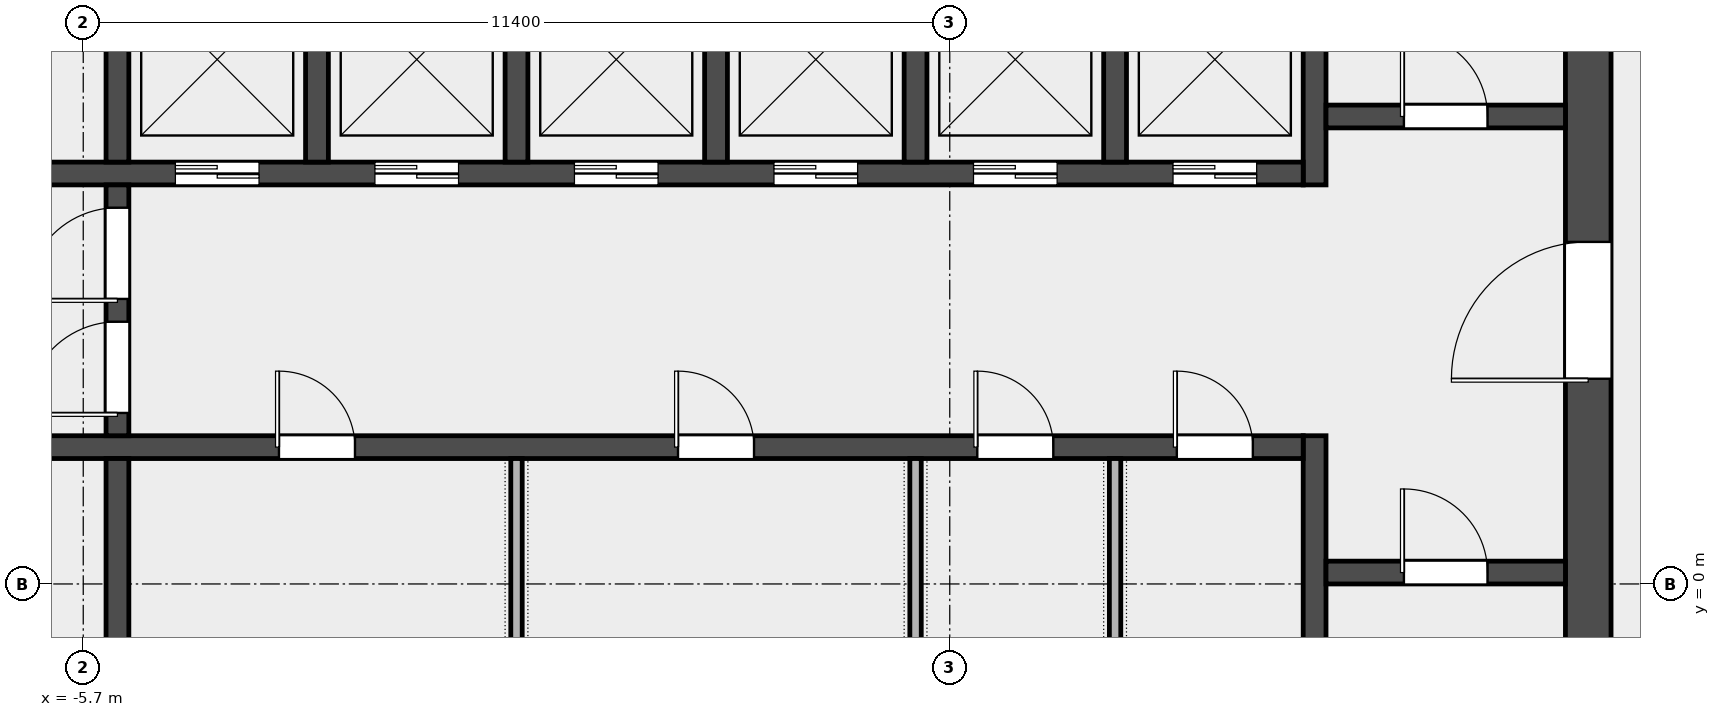
"""IFC4 building model, lengths in metres.
Left out: names, types, materials, properties, quantities, classifications, styles, units other than length and angle.
Written with IfcOpenShell. Run it as: python <this file> out.ifc"""

import sys

from ifc_helpers import new_model, si_unit, direction, frame, frame_2d, origin, place, context, subcontext, project, spatial, rectangle, extrude, element, fill, save


model = new_model("IFC4")
c1 = context("Model", 3, precision=1e-05, world=origin(), true_north=direction((0.0, 1.0)))
c2 = subcontext(c1, "Body", "Model", "MODEL_VIEW")
j1 = project(units=[si_unit("LENGTHUNIT", "METRE"), si_unit("PLANEANGLEUNIT", "RADIAN")], contexts=[c1])
p1 = place(None, origin())
s1 = spatial("IfcSite", under=j1, at=p1, CompositionType="ELEMENT")
p2 = place(p1, origin())
s2 = spatial("IfcBuilding", under=s1, at=p2, CompositionType="ELEMENT")
p3 = place(p2, frame((0.0, 0.0, 219.0)))
s3 = spatial("IfcBuildingStorey", under=s2, at=p3, CompositionType="ELEMENT", Elevation=219.0)
p4 = place(p3, frame((14.1, -6.6, 0.0), z_axis=(0.0, 0.0, 1.0), x_axis=(0.0, 1.0, 0.0)))
e1 = element("IfcWall", 1, at=p4, inside=s3, PredefinedType="SHEAR", context=c2, shape_type="SweptSolid", body=[
    extrude(rectangle(XDim=19.5, YDim=0.6, at=frame_2d((9.75, 0.0))), origin(), (0.0, 0.0, 1.0), 3.7),
])
p5 = place(p4, frame((9.3, 0.0, 0.0)))
e2 = element("IfcOpeningElement", 2, at=p5, cuts=e1, PredefinedType="OPENING", context=c2, shape_type="SweptSolid", body=[
    extrude(rectangle(XDim=1.8, YDim=2.1, at=frame_2d((0.9, 1.05))), frame((0.0, 0.312, 0.0), z_axis=(0.0, -1.0, 0.0), x_axis=(1.0, 0.0, 0.0)), (0.0, 0.0, 1.0), 0.624),
])
p6 = place(p3, frame((10.5, -6.6, 0.0), z_axis=(0.0, 0.0, 1.0), x_axis=(0.0, 1.0, 0.0)))
e3 = element("IfcWall", 3, at=p6, inside=s3, PredefinedType="SHEAR", context=c2, shape_type="SweptSolid", body=[
    extrude(rectangle(XDim=8.55, YDim=0.3, at=frame_2d((4.275, 0.0))), origin(), (0.0, 0.0, 1.0), 3.7),
])
p7 = place(p3, frame((10.5, 5.25, 0.0), z_axis=(0.0, 0.0, 1.0), x_axis=(0.0, 1.0, 0.0)))
e4 = element("IfcWall", 4, at=p7, inside=s3, PredefinedType="SHEAR", context=c2, shape_type="SweptSolid", body=[
    extrude(rectangle(XDim=7.65, YDim=0.3, at=frame_2d((3.825, 0.0))), origin(), (0.0, 0.0, 1.0), 3.7),
])
p8 = place(p3, frame((10.65, 0.15, 0.0), z_axis=(0.0, 0.0, 1.0), x_axis=(1.0, 0.0, 0.0)))
e5 = element("IfcWall", 5, at=p8, inside=s3, PredefinedType="SOLIDWALL", context=c2, shape_type="SweptSolid", body=[
    extrude(rectangle(XDim=3.15, YDim=0.3, at=frame_2d((1.575, 0.0))), origin(), (0.0, 0.0, 1.0), 3.7),
])
p9 = place(p8, frame((1.025, 0.0, 0.0)))
e6 = element("IfcOpeningElement", 6, at=p9, cuts=e5, PredefinedType="OPENING", context=c2, shape_type="SweptSolid", body=[
    extrude(rectangle(XDim=1.1, YDim=2.1, at=frame_2d((0.55, 1.05))), frame((0.0, 0.162, 0.0), z_axis=(0.0, -1.0, 0.0), x_axis=(1.0, 0.0, 0.0)), (0.0, 0.0, 1.0), 0.324),
])
p10 = place(p3, frame((10.65, 6.15, 0.0), z_axis=(0.0, 0.0, 1.0), x_axis=(1.0, 0.0, 0.0)))
e7 = element("IfcWall", 7, at=p10, inside=s3, PredefinedType="SOLIDWALL", context=c2, shape_type="SweptSolid", body=[
    extrude(rectangle(XDim=3.15, YDim=0.3, at=frame_2d((1.575, 0.0))), origin(), (0.0, 0.0, 1.0), 3.7),
])
p11 = place(p10, frame((1.025, 0.0, 0.0)))
e8 = element("IfcOpeningElement", 8, at=p11, cuts=e7, PredefinedType="OPENING", context=c2, shape_type="SweptSolid", body=[
    extrude(rectangle(XDim=1.1, YDim=2.1, at=frame_2d((0.55, 1.05))), frame((0.0, 0.162, 0.0), z_axis=(0.0, -1.0, 0.0), x_axis=(1.0, 0.0, 0.0)), (0.0, 0.0, 1.0), 0.324),
])
p12 = place(p3, frame((-10.35, 1.8, 0.0), z_axis=(0.0, 0.0, 1.0), x_axis=(1.0, 0.0, 0.0)))
e9 = element("IfcWall", 9, at=p12, inside=s3, PredefinedType="SOLIDWALL", context=c2, shape_type="SweptSolid", body=[
    extrude(rectangle(XDim=20.7, YDim=0.3, at=frame_2d((10.35, 0.0))), origin(), (0.0, 0.0, 1.0), 3.7),
])
p13 = place(p12, frame((0.512, 0.0, 0.0)))
e10 = element("IfcOpeningElement", 10, at=p13, cuts=e9, PredefinedType="OPENING", context=c2, shape_type="SweptSolid", body=[
    extrude(rectangle(XDim=1.3, YDim=2.1, at=frame_2d((0.65, 1.05))), frame((0.0, 0.162, 0.0), z_axis=(0.0, -1.0, 0.0), x_axis=(1.0, 0.0, 0.0)), (0.0, 0.0, 1.0), 0.324),
])
p14 = place(p12, frame((7.225, 0.0, 0.0)))
e11 = element("IfcOpeningElement", 11, at=p14, cuts=e9, PredefinedType="OPENING", context=c2, shape_type="SweptSolid", body=[
    extrude(rectangle(XDim=1.0, YDim=2.1, at=frame_2d((0.5, 1.05))), frame((0.0, 0.162, 0.0), z_axis=(0.0, -1.0, 0.0), x_axis=(1.0, 0.0, 0.0)), (0.0, 0.0, 1.0), 0.324),
])
p15 = place(p12, frame((12.475, 0.0, 0.0)))
e12 = element("IfcOpeningElement", 12, at=p15, cuts=e9, PredefinedType="OPENING", context=c2, shape_type="SweptSolid", body=[
    extrude(rectangle(XDim=1.0, YDim=2.1, at=frame_2d((0.5, 1.05))), frame((0.0, 0.162, 0.0), z_axis=(0.0, -1.0, 0.0), x_axis=(1.0, 0.0, 0.0)), (0.0, 0.0, 1.0), 0.324),
])
p16 = place(p12, frame((16.413, 0.0, 0.0)))
e13 = element("IfcOpeningElement", 13, at=p16, cuts=e9, PredefinedType="OPENING", context=c2, shape_type="SweptSolid", body=[
    extrude(rectangle(XDim=1.0, YDim=2.1, at=frame_2d((0.5, 1.05))), frame((0.0, 0.162, 0.0), z_axis=(0.0, -1.0, 0.0), x_axis=(1.0, 0.0, 0.0)), (0.0, 0.0, 1.0), 0.324),
])
p17 = place(p12, frame((19.038, 0.0, 0.0)))
e14 = element("IfcOpeningElement", 14, at=p17, cuts=e9, PredefinedType="OPENING", context=c2, shape_type="SweptSolid", body=[
    extrude(rectangle(XDim=1.0, YDim=2.1, at=frame_2d((0.5, 1.05))), frame((0.0, 0.162, 0.0), z_axis=(0.0, -1.0, 0.0), x_axis=(1.0, 0.0, 0.0)), (0.0, 0.0, 1.0), 0.324),
])
p18 = place(p3, frame((-10.35, 5.4, 0.0), z_axis=(0.0, 0.0, 1.0), x_axis=(1.0, 0.0, 0.0)))
e15 = element("IfcWall", 15, at=p18, inside=s3, PredefinedType="SOLIDWALL", context=c2, shape_type="SweptSolid", body=[
    extrude(rectangle(XDim=20.7, YDim=0.3, at=frame_2d((10.35, 0.0))), origin(), (0.0, 0.0, 1.0), 3.7),
])
p19 = place(p18, frame((0.512, 0.0, 0.0)))
e16 = element("IfcOpeningElement", 16, at=p19, cuts=e15, PredefinedType="OPENING", context=c2, shape_type="SweptSolid", body=[
    extrude(rectangle(XDim=1.3, YDim=2.1, at=frame_2d((0.65, 1.05))), frame((0.0, 0.162, 0.0), z_axis=(0.0, -1.0, 0.0), x_axis=(1.0, 0.0, 0.0)), (0.0, 0.0, 1.0), 0.324),
])
p20 = place(p18, frame((5.863, 0.0, 0.0)))
e17 = element("IfcOpeningElement", 17, at=p20, cuts=e15, PredefinedType="OPENING", context=c2, shape_type="SweptSolid", body=[
    extrude(rectangle(XDim=1.1, YDim=2.1, at=frame_2d((0.55, 1.05))), frame((0.0, 0.162, 0.0), z_axis=(0.0, -1.0, 0.0), x_axis=(1.0, 0.0, 0.0)), (0.0, 0.0, 1.0), 0.324),
])
p21 = place(p18, frame((8.488, 0.0, 0.0)))
e18 = element("IfcOpeningElement", 18, at=p21, cuts=e15, PredefinedType="OPENING", context=c2, shape_type="SweptSolid", body=[
    extrude(rectangle(XDim=1.1, YDim=2.1, at=frame_2d((0.55, 1.05))), frame((0.0, 0.162, 0.0), z_axis=(0.0, -1.0, 0.0), x_axis=(1.0, 0.0, 0.0)), (0.0, 0.0, 1.0), 0.324),
])
p22 = place(p18, frame((11.113, 0.0, 0.0)))
e19 = element("IfcOpeningElement", 19, at=p22, cuts=e15, PredefinedType="OPENING", context=c2, shape_type="SweptSolid", body=[
    extrude(rectangle(XDim=1.1, YDim=2.1, at=frame_2d((0.55, 1.05))), frame((0.0, 0.162, 0.0), z_axis=(0.0, -1.0, 0.0), x_axis=(1.0, 0.0, 0.0)), (0.0, 0.0, 1.0), 0.324),
])
p23 = place(p18, frame((13.738, 0.0, 0.0)))
e20 = element("IfcOpeningElement", 20, at=p23, cuts=e15, PredefinedType="OPENING", context=c2, shape_type="SweptSolid", body=[
    extrude(rectangle(XDim=1.1, YDim=2.1, at=frame_2d((0.55, 1.05))), frame((0.0, 0.162, 0.0), z_axis=(0.0, -1.0, 0.0), x_axis=(1.0, 0.0, 0.0)), (0.0, 0.0, 1.0), 0.324),
])
p24 = place(p18, frame((16.363, 0.0, 0.0)))
e21 = element("IfcOpeningElement", 21, at=p24, cuts=e15, PredefinedType="OPENING", context=c2, shape_type="SweptSolid", body=[
    extrude(rectangle(XDim=1.1, YDim=2.1, at=frame_2d((0.55, 1.05))), frame((0.0, 0.162, 0.0), z_axis=(0.0, -1.0, 0.0), x_axis=(1.0, 0.0, 0.0)), (0.0, 0.0, 1.0), 0.324),
])
p25 = place(p18, frame((18.988, 0.0, 0.0)))
e22 = element("IfcOpeningElement", 22, at=p25, cuts=e15, PredefinedType="OPENING", context=c2, shape_type="SweptSolid", body=[
    extrude(rectangle(XDim=1.1, YDim=2.1, at=frame_2d((0.55, 1.05))), frame((0.0, 0.162, 0.0), z_axis=(0.0, -1.0, 0.0), x_axis=(1.0, 0.0, 0.0)), (0.0, 0.0, 1.0), 0.324),
])
for number, where, z_axis, x_axis in (
    (23, (-5.25, -1.05, 0.0), (0.0, 0.0, 1.0), (0.0, 1.0, 0.0)),
    (24, (-5.25, 5.55, 0.0), (0.0, 0.0, 1.0), (0.0, 1.0, 0.0)),
    (25, (-2.625, 5.55, 0.0), (0.0, 0.0, 1.0), (0.0, 1.0, 0.0)),
    (26, (0.0, 5.55, 0.0), (0.0, 0.0, 1.0), (0.0, 1.0, 0.0)),
    (27, (2.625, 5.55, 0.0), (0.0, 0.0, 1.0), (0.0, 1.0, 0.0)),
    (28, (5.25, 5.55, 0.0), (0.0, 0.0, 1.0), (0.0, 1.0, 0.0)),
    (29, (7.875, 5.55, 0.0), (0.0, 0.0, 1.0), (0.0, 1.0, 0.0)),
):
    element("IfcWall", number, at=place(p3, frame(where, z_axis=z_axis, x_axis=x_axis)), inside=s3, PredefinedType="SOLIDWALL", context=c2, shape_type="SweptSolid", body=[
        extrude(rectangle(XDim=2.7, YDim=0.3, at=frame_2d((1.35, 0.0))), origin(), (0.0, 0.0, 1.0), 3.7),
    ])
p26 = place(p3, frame((-5.25, 1.95, 0.0), z_axis=(0.0, 0.0, 1.0), x_axis=(0.0, 1.0, 0.0)))
e30 = element("IfcWall", 30, at=p26, inside=s3, PredefinedType="SOLIDWALL", context=c2, shape_type="SweptSolid", body=[
    extrude(rectangle(XDim=3.3, YDim=0.3, at=frame_2d((1.65, 0.0))), origin(), (0.0, 0.0, 1.0), 3.7),
])
p27 = place(p26, frame((0.3, 0.0, 0.0)))
e31 = element("IfcOpeningElement", 31, at=p27, cuts=e30, PredefinedType="OPENING", context=c2, shape_type="SweptSolid", body=[
    extrude(rectangle(XDim=1.2, YDim=2.1, at=frame_2d((0.6, 1.05))), frame((0.0, 0.162, 0.0), z_axis=(0.0, -1.0, 0.0), x_axis=(1.0, 0.0, 0.0)), (0.0, 0.0, 1.0), 0.324),
])
p28 = place(p26, frame((1.8, 0.0, 0.0)))
e32 = element("IfcOpeningElement", 32, at=p28, cuts=e30, PredefinedType="OPENING", context=c2, shape_type="SweptSolid", body=[
    extrude(rectangle(XDim=1.2, YDim=2.1, at=frame_2d((0.6, 1.05))), frame((0.0, 0.162, 0.0), z_axis=(0.0, -1.0, 0.0), x_axis=(1.0, 0.0, 0.0)), (0.0, 0.0, 1.0), 0.324),
])
for number, where, z_axis, x_axis in (
    (33, (0.0, -1.05, 0.0), (0.0, 0.0, 1.0), (0.0, 1.0, 0.0)),
    (34, (5.25, -1.05, 0.0), (0.0, 0.0, 1.0), (0.0, 1.0, 0.0)),
    (35, (7.875, -1.05, 0.0), (0.0, 0.0, 1.0), (0.0, 1.0, 0.0)),
):
    element("IfcWall", number, at=place(p3, frame(where, z_axis=z_axis, x_axis=x_axis)), inside=s3, PredefinedType="PARTITIONING", context=c2, shape_type="SweptSolid", body=[
        extrude(rectangle(XDim=2.7, YDim=0.15, at=frame_2d((1.35, 0.0))), origin(), (0.0, 0.0, 1.0), 3.7),
    ])
p29 = place(p9, origin())
e36 = element("IfcDoor", 36, at=p29, inside=s3, OperationType="SINGLE_SWING_RIGHT", PredefinedType="DOOR", context=c2, shape_type="SweptSolid", body=[
    extrude(rectangle(XDim=1.1, YDim=2.1, at=frame_2d((0.55, 1.05))), frame((0.0, 0.025, 0.0), z_axis=(0.0, -1.0, 0.0), x_axis=(1.0, 0.0, 0.0)), (0.0, 0.0, 1.0), 0.05),
])
fill(e6, e36)
p30 = place(p11, origin())
e37 = element("IfcDoor", 37, at=p30, inside=s3, OperationType="SINGLE_SWING_RIGHT", PredefinedType="DOOR", context=c2, shape_type="SweptSolid", body=[
    extrude(rectangle(XDim=1.1, YDim=2.1, at=frame_2d((0.55, 1.05))), frame((0.0, 0.025, 0.0), z_axis=(0.0, -1.0, 0.0), x_axis=(1.0, 0.0, 0.0)), (0.0, 0.0, 1.0), 0.05),
])
fill(e8, e37)
p31 = place(p5, origin())
e38 = element("IfcDoor", 38, at=p31, inside=s3, OperationType="DOUBLE_DOOR_SINGLE_SWING", PredefinedType="DOOR", context=c2, shape_type="SweptSolid", body=[
    extrude(rectangle(XDim=1.8, YDim=2.1, at=frame_2d((0.9, 1.05))), frame((0.0, 0.025, 0.0), z_axis=(0.0, -1.0, 0.0), x_axis=(1.0, 0.0, 0.0)), (0.0, 0.0, 1.0), 0.05),
])
fill(e2, e38)
p32 = place(p27, origin())
e39 = element("IfcDoor", 39, at=p32, inside=s3, OperationType="SINGLE_SWING_LEFT", PredefinedType="DOOR", context=c2, shape_type="SweptSolid", body=[
    extrude(rectangle(XDim=1.2, YDim=2.1, at=frame_2d((0.6, 1.05))), frame((0.0, 0.025, 0.0), z_axis=(0.0, -1.0, 0.0), x_axis=(1.0, 0.0, 0.0)), (0.0, 0.0, 1.0), 0.05),
])
fill(e31, e39)
p33 = place(p28, origin())
e40 = element("IfcDoor", 40, at=p33, inside=s3, OperationType="SINGLE_SWING_RIGHT", PredefinedType="DOOR", context=c2, shape_type="SweptSolid", body=[
    extrude(rectangle(XDim=1.2, YDim=2.1, at=frame_2d((0.6, 1.05))), frame((0.0, 0.025, 0.0), z_axis=(0.0, -1.0, 0.0), x_axis=(1.0, 0.0, 0.0)), (0.0, 0.0, 1.0), 0.05),
])
fill(e32, e40)
p34 = place(p20, origin())
e41 = element("IfcDoor", 41, at=p34, inside=s3, OperationType="DOUBLE_DOOR_SLIDING", PredefinedType="DOOR", context=c2, shape_type="SweptSolid", body=[
    extrude(rectangle(XDim=1.1, YDim=2.1, at=frame_2d((0.55, 1.05))), frame((0.0, 0.025, 0.0), z_axis=(0.0, -1.0, 0.0), x_axis=(1.0, 0.0, 0.0)), (0.0, 0.0, 1.0), 0.05),
])
fill(e17, e41)
p35 = place(p21, origin())
e42 = element("IfcDoor", 42, at=p35, inside=s3, OperationType="DOUBLE_DOOR_SLIDING", PredefinedType="DOOR", context=c2, shape_type="SweptSolid", body=[
    extrude(rectangle(XDim=1.1, YDim=2.1, at=frame_2d((0.55, 1.05))), frame((0.0, 0.025, 0.0), z_axis=(0.0, -1.0, 0.0), x_axis=(1.0, 0.0, 0.0)), (0.0, 0.0, 1.0), 0.05),
])
fill(e18, e42)
p36 = place(p22, origin())
e43 = element("IfcDoor", 43, at=p36, inside=s3, OperationType="DOUBLE_DOOR_SLIDING", PredefinedType="DOOR", context=c2, shape_type="SweptSolid", body=[
    extrude(rectangle(XDim=1.1, YDim=2.1, at=frame_2d((0.55, 1.05))), frame((0.0, 0.025, 0.0), z_axis=(0.0, -1.0, 0.0), x_axis=(1.0, 0.0, 0.0)), (0.0, 0.0, 1.0), 0.05),
])
fill(e19, e43)
p37 = place(p23, origin())
e44 = element("IfcDoor", 44, at=p37, inside=s3, OperationType="DOUBLE_DOOR_SLIDING", PredefinedType="DOOR", context=c2, shape_type="SweptSolid", body=[
    extrude(rectangle(XDim=1.1, YDim=2.1, at=frame_2d((0.55, 1.05))), frame((0.0, 0.025, 0.0), z_axis=(0.0, -1.0, 0.0), x_axis=(1.0, 0.0, 0.0)), (0.0, 0.0, 1.0), 0.05),
])
fill(e20, e44)
p38 = place(p24, origin())
e45 = element("IfcDoor", 45, at=p38, inside=s3, OperationType="DOUBLE_DOOR_SLIDING", PredefinedType="DOOR", context=c2, shape_type="SweptSolid", body=[
    extrude(rectangle(XDim=1.1, YDim=2.1, at=frame_2d((0.55, 1.05))), frame((0.0, 0.025, 0.0), z_axis=(0.0, -1.0, 0.0), x_axis=(1.0, 0.0, 0.0)), (0.0, 0.0, 1.0), 0.05),
])
fill(e21, e45)
p39 = place(p25, origin())
e46 = element("IfcDoor", 46, at=p39, inside=s3, OperationType="DOUBLE_DOOR_SLIDING", PredefinedType="DOOR", context=c2, shape_type="SweptSolid", body=[
    extrude(rectangle(XDim=1.1, YDim=2.1, at=frame_2d((0.55, 1.05))), frame((0.0, 0.025, 0.0), z_axis=(0.0, -1.0, 0.0), x_axis=(1.0, 0.0, 0.0)), (0.0, 0.0, 1.0), 0.05),
])
fill(e22, e46)
p40 = place(p14, origin())
e47 = element("IfcDoor", 47, at=p40, inside=s3, OperationType="SINGLE_SWING_LEFT", PredefinedType="DOOR", context=c2, shape_type="SweptSolid", body=[
    extrude(rectangle(XDim=1.0, YDim=2.1, at=frame_2d((0.5, 1.05))), frame((0.0, 0.025, 0.0), z_axis=(0.0, -1.0, 0.0), x_axis=(1.0, 0.0, 0.0)), (0.0, 0.0, 1.0), 0.05),
])
fill(e11, e47)
p41 = place(p15, origin())
e48 = element("IfcDoor", 48, at=p41, inside=s3, OperationType="SINGLE_SWING_LEFT", PredefinedType="DOOR", context=c2, shape_type="SweptSolid", body=[
    extrude(rectangle(XDim=1.0, YDim=2.1, at=frame_2d((0.5, 1.05))), frame((0.0, 0.025, 0.0), z_axis=(0.0, -1.0, 0.0), x_axis=(1.0, 0.0, 0.0)), (0.0, 0.0, 1.0), 0.05),
])
fill(e12, e48)
p42 = place(p16, origin())
e49 = element("IfcDoor", 49, at=p42, inside=s3, OperationType="SINGLE_SWING_LEFT", PredefinedType="DOOR", context=c2, shape_type="SweptSolid", body=[
    extrude(rectangle(XDim=1.0, YDim=2.1, at=frame_2d((0.5, 1.05))), frame((0.0, 0.025, 0.0), z_axis=(0.0, -1.0, 0.0), x_axis=(1.0, 0.0, 0.0)), (0.0, 0.0, 1.0), 0.05),
])
fill(e13, e49)
p43 = place(p17, origin())
e50 = element("IfcDoor", 50, at=p43, inside=s3, OperationType="SINGLE_SWING_LEFT", PredefinedType="DOOR", context=c2, shape_type="SweptSolid", body=[
    extrude(rectangle(XDim=1.0, YDim=2.1, at=frame_2d((0.5, 1.05))), frame((0.0, 0.025, 0.0), z_axis=(0.0, -1.0, 0.0), x_axis=(1.0, 0.0, 0.0)), (0.0, 0.0, 1.0), 0.05),
])
fill(e14, e50)
save(model, sys.argv[1])
